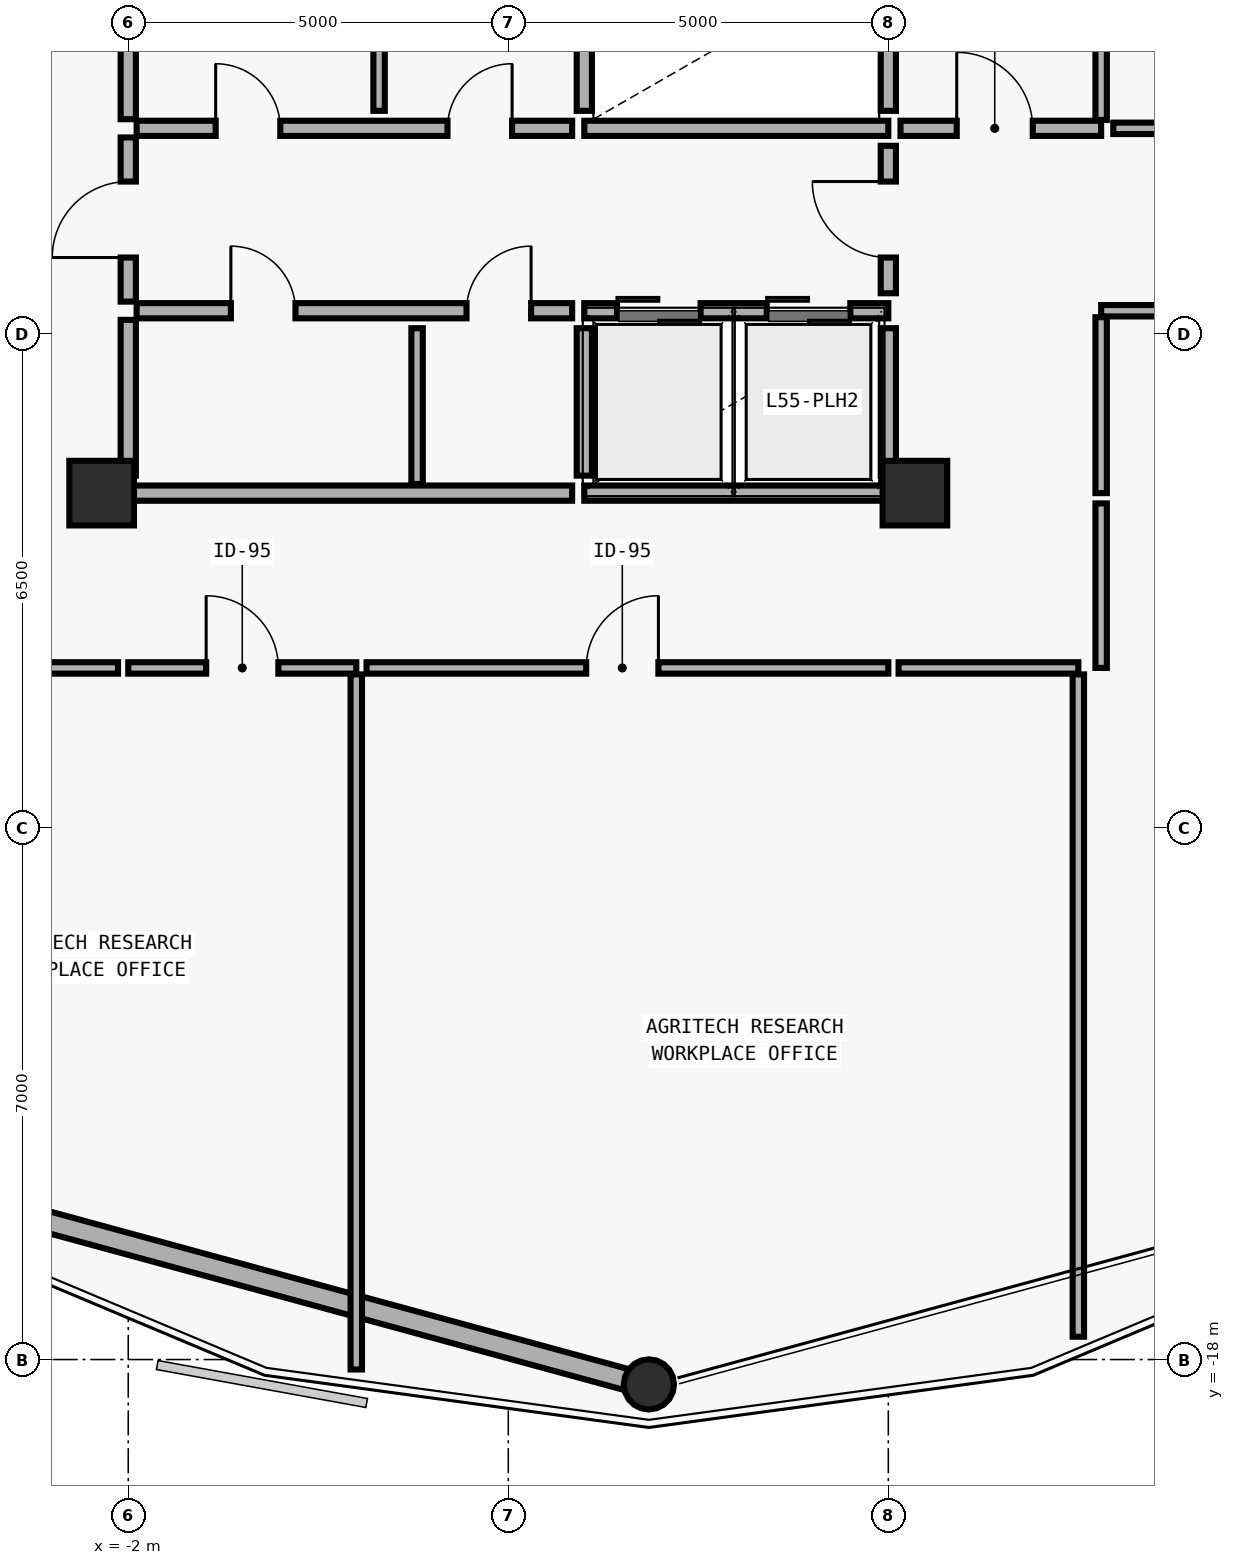
"""IFC4 building model, lengths in metres.
Left out: names, types, materials, properties, quantities, classifications, styles, units other than length and angle.
Written with IfcOpenShell. Run it as: python <this file> out.ifc"""

import sys

from ifc_helpers import new_model, si_unit, direction, frame, frame_2d, origin, origin_2d, place, context, subcontext, project, spatial, rectangle, hollow_circle, extrude, element, fill, save


model = new_model("IFC4")
c1 = context("Model", 3, precision=1e-05, world=origin(), true_north=direction((0.0, 1.0)))
c2 = subcontext(c1, "Body", "Model", "MODEL_VIEW")
j1 = project(units=[si_unit("LENGTHUNIT", "METRE"), si_unit("PLANEANGLEUNIT", "RADIAN")], contexts=[c1])
p1 = place(None, origin())
s1 = spatial("IfcSite", under=j1, at=p1, CompositionType="ELEMENT")
p2 = place(p1, origin())
s2 = spatial("IfcBuilding", under=s1, at=p2, CompositionType="ELEMENT")
p3 = place(p2, frame((0.0, 0.0, 218.4)))
s3 = spatial("IfcBuildingStorey", under=s2, at=p3, CompositionType="ELEMENT", Elevation=218.4)
for number, where, z_axis, x_axis in (
    (1, (-2.35, -6.6, 0.0), (0.0, 0.0, 1.0), (1.0, 0.0, 0.0)),
    (2, (8.35, -6.6, 0.0), (0.0, 0.0, 1.0), (1.0, 0.0, 0.0)),
):
    element("IfcColumn", number, at=place(p3, frame(where, z_axis=z_axis, x_axis=x_axis)), inside=s3, PredefinedType="COLUMN", context=c2, shape_type="SweptSolid", body=[
        extrude(rectangle(XDim=0.85, YDim=0.85, at=origin_2d()), origin(), (0.0, 0.0, 1.0), 3.575),
    ])
p4 = place(p3, frame((4.85, -18.344, 0.0), z_axis=(0.0, 0.009491514524, 0.999954954561), x_axis=(-1.0, 0.0, 0.0)))
e3 = element("IfcColumn", 3, at=p4, inside=s3, PredefinedType="COLUMN", context=c2, shape_type="SweptSolid", body=[
    extrude(hollow_circle(Radius=0.33, WallThickness=0.025, at=origin_2d()), origin(), (0.0, 0.0, 1.0), 3.575),
])
p5 = place(p3, frame((4.575, -18.269, 0.0), z_axis=(0.0, 0.0, 1.0), x_axis=(-0.964845001115, 0.262819565145, 0.0)))
e4 = element("IfcWall", 4, at=p5, inside=s3, PredefinedType="SOLIDWALL", context=c2, shape_type="SweptSolid", body=[
    extrude(rectangle(XDim=9.225, YDim=0.28, at=frame_2d((4.613, 0.0))), origin(), (0.0, 0.0, 1.0), 2.93),
])
p6 = place(p3, frame((4.0, -1.8, 0.0), z_axis=(0.0, 0.0, 1.0), x_axis=(1.0, 0.0, 0.0)))
e5 = element("IfcWall", 5, at=p6, inside=s3, PredefinedType="SOLIDWALL", context=c2, shape_type="SweptSolid", body=[
    extrude(rectangle(XDim=4.0, YDim=0.2, at=frame_2d((2.0, 0.0))), origin(), (0.0, 0.0, 1.0), 3.36),
])
p7 = place(p3, frame((4.0, -1.57, 0.0), z_axis=(0.0, 0.0, 1.0), x_axis=(0.0, 1.0, 0.0)))
e6 = element("IfcWall", 6, at=p7, inside=s3, PredefinedType="SOLIDWALL", context=c2, shape_type="SweptSolid", body=[
    extrude(rectangle(XDim=1.94, YDim=0.2, at=frame_2d((0.97, 0.0))), origin(), (0.0, 0.0, 1.0), 3.36),
])
p8 = place(p3, frame((8.0, -1.57, 0.0), z_axis=(0.0, 0.0, 1.0), x_axis=(0.0, 1.0, 0.0)))
e7 = element("IfcWall", 7, at=p8, inside=s3, PredefinedType="SOLIDWALL", context=c2, shape_type="SweptSolid", body=[
    extrude(rectangle(XDim=2.05, YDim=0.2, at=frame_2d((1.025, 0.0))), origin(), (0.0, 0.0, 1.0), 3.012),
])
p9 = place(p3, frame((4.0, -4.2, 0.0), z_axis=(0.0, 0.0, 1.0), x_axis=(1.0, 0.0, 0.0)))
e8 = element("IfcWall", 8, at=p9, inside=s3, PredefinedType="SOLIDWALL", context=c2, shape_type="SweptSolid", body=[
    extrude(rectangle(XDim=4.0, YDim=0.2, at=frame_2d((2.0, 0.0))), origin(), (0.0, 0.0, 1.0), 3.36),
])
p10 = place(p9, frame((0.43, 0.0, 0.0)))
e9 = element("IfcOpeningElement", 9, at=p10, cuts=e8, PredefinedType="OPENING", context=c2, shape_type="SweptSolid", body=[
    extrude(rectangle(XDim=1.1, YDim=2.2, at=frame_2d((0.55, 1.1))), frame((0.0, 0.11, 0.0), z_axis=(0.0, -1.0, 0.0), x_axis=(1.0, 0.0, 0.0)), (0.0, 0.0, 1.0), 0.22),
])
p11 = place(p9, frame((2.4, 0.0, 0.0)))
e10 = element("IfcOpeningElement", 10, at=p11, cuts=e8, PredefinedType="OPENING", context=c2, shape_type="SweptSolid", body=[
    extrude(rectangle(XDim=1.1, YDim=2.2, at=frame_2d((0.55, 1.1))), frame((0.0, 0.11, 0.0), z_axis=(0.0, -1.0, 0.0), x_axis=(1.0, 0.0, 0.0)), (0.0, 0.0, 1.0), 0.22),
])
p12 = place(p3, frame((4.0, -6.6, 0.0), z_axis=(0.0, 0.0, 1.0), x_axis=(1.0, 0.0, 0.0)))
e11 = element("IfcWall", 11, at=p12, inside=s3, PredefinedType="SOLIDWALL", context=c2, shape_type="SweptSolid", body=[
    extrude(rectangle(XDim=4.0, YDim=0.2, at=frame_2d((2.0, 0.0))), origin(), (0.0, 0.0, 1.0), 3.012),
])
p13 = place(p3, frame((4.0, -6.37, 0.0), z_axis=(0.0, 0.0, 1.0), x_axis=(0.0, 1.0, 0.0)))
e12 = element("IfcWall", 12, at=p13, inside=s3, PredefinedType="SOLIDWALL", context=c2, shape_type="SweptSolid", body=[
    extrude(rectangle(XDim=1.94, YDim=0.2, at=frame_2d((0.97, 0.0))), origin(), (0.0, 0.0, 1.0), 3.36),
])
p14 = place(p3, frame((8.0, -6.37, 0.0), z_axis=(0.0, 0.0, 1.0), x_axis=(0.0, 1.0, 0.0)))
e13 = element("IfcWall", 13, at=p14, inside=s3, PredefinedType="SOLIDWALL", context=c2, shape_type="SweptSolid", body=[
    extrude(rectangle(XDim=1.94, YDim=0.2, at=frame_2d((0.97, 0.0))), origin(), (0.0, 0.0, 1.0), 3.012),
])
p15 = place(p3, frame((-2.0, -4.08, 0.0), z_axis=(0.0, 0.0, 1.0), x_axis=(0.0, 1.0, 0.0)))
e14 = element("IfcWall", 14, at=p15, inside=s3, PredefinedType="MOVABLE", context=c2, shape_type="SweptSolid", body=[
    extrude(rectangle(XDim=2.16, YDim=0.2, at=frame_2d((1.08, 0.0))), origin(), (0.0, 0.0, 1.0), 3.012),
])
p16 = place(p15, frame((0.58, 0.0, 0.0)))
e15 = element("IfcOpeningElement", 15, at=p16, cuts=e14, PredefinedType="OPENING", context=c2, shape_type="SweptSolid", body=[
    extrude(rectangle(XDim=1.0, YDim=2.1, at=frame_2d((0.5, 1.05))), frame((0.0, 0.11, 0.0), z_axis=(0.0, -1.0, 0.0), x_axis=(1.0, 0.0, 0.0)), (0.0, 0.0, 1.0), 0.22),
])
p17 = place(p3, frame((8.0, -3.97, 0.0), z_axis=(0.0, 0.0, 1.0), x_axis=(0.0, 1.0, 0.0)))
e16 = element("IfcWall", 16, at=p17, inside=s3, PredefinedType="MOVABLE", context=c2, shape_type="SweptSolid", body=[
    extrude(rectangle(XDim=1.94, YDim=0.2, at=frame_2d((0.97, 0.0))), origin(), (0.0, 0.0, 1.0), 3.012),
])
p18 = place(p17, frame((0.47, 0.0, 0.0)))
e17 = element("IfcOpeningElement", 17, at=p18, cuts=e16, PredefinedType="OPENING", context=c2, shape_type="SweptSolid", body=[
    extrude(rectangle(XDim=1.0, YDim=2.1, at=frame_2d((0.5, 1.05))), frame((0.0, 0.11, 0.0), z_axis=(0.0, -1.0, 0.0), x_axis=(1.0, 0.0, 0.0)), (0.0, 0.0, 1.0), 0.22),
])
p19 = place(p3, frame((-1.89, -1.8, 0.0), z_axis=(0.0, 0.0, 1.0), x_axis=(1.0, 0.0, 0.0)))
e18 = element("IfcWall", 18, at=p19, inside=s3, PredefinedType="MOVABLE", context=c2, shape_type="SweptSolid", body=[
    extrude(rectangle(XDim=5.73, YDim=0.2, at=frame_2d((2.865, 0.0))), origin(), (0.0, 0.0, 1.0), 3.36),
])
p20 = place(p19, frame((1.04, 0.0, 0.0)))
e19 = element("IfcOpeningElement", 19, at=p20, cuts=e18, PredefinedType="OPENING", context=c2, shape_type="SweptSolid", body=[
    extrude(rectangle(XDim=0.85, YDim=2.1, at=frame_2d((0.425, 1.05))), frame((0.0, 0.11, 0.0), z_axis=(0.0, -1.0, 0.0), x_axis=(1.0, 0.0, 0.0)), (0.0, 0.0, 1.0), 0.22),
])
p21 = place(p19, frame((4.09, 0.0, 0.0)))
e20 = element("IfcOpeningElement", 20, at=p21, cuts=e18, PredefinedType="OPENING", context=c2, shape_type="SweptSolid", body=[
    extrude(rectangle(XDim=0.85, YDim=2.1, at=frame_2d((0.425, 1.05))), frame((0.0, 0.11, 0.0), z_axis=(0.0, -1.0, 0.0), x_axis=(1.0, 0.0, 0.0)), (0.0, 0.0, 1.0), 0.22),
])
p22 = place(p3, frame((-1.89, -4.2, 0.0), z_axis=(0.0, 0.0, 1.0), x_axis=(1.0, 0.0, 0.0)))
e21 = element("IfcWall", 21, at=p22, inside=s3, PredefinedType="MOVABLE", context=c2, shape_type="SweptSolid", body=[
    extrude(rectangle(XDim=5.73, YDim=0.2, at=frame_2d((2.865, 0.0))), origin(), (0.0, 0.0, 1.0), 3.36),
])
p23 = place(p22, frame((1.24, 0.0, 0.0)))
e22 = element("IfcOpeningElement", 22, at=p23, cuts=e21, PredefinedType="OPENING", context=c2, shape_type="SweptSolid", body=[
    extrude(rectangle(XDim=0.85, YDim=2.1, at=frame_2d((0.425, 1.05))), frame((0.0, 0.11, 0.0), z_axis=(0.0, -1.0, 0.0), x_axis=(1.0, 0.0, 0.0)), (0.0, 0.0, 1.0), 0.22),
])
p24 = place(p22, frame((4.34, 0.0, 0.0)))
e23 = element("IfcOpeningElement", 23, at=p24, cuts=e21, PredefinedType="OPENING", context=c2, shape_type="SweptSolid", body=[
    extrude(rectangle(XDim=0.85, YDim=2.1, at=frame_2d((0.425, 1.05))), frame((0.0, 0.11, 0.0), z_axis=(0.0, -1.0, 0.0), x_axis=(1.0, 0.0, 0.0)), (0.0, 0.0, 1.0), 0.22),
])
p25 = place(p3, frame((8.16, -1.8, 0.0), z_axis=(0.0, 0.0, 1.0), x_axis=(1.0, 0.0, 0.0)))
e24 = element("IfcWall", 24, at=p25, inside=s3, PredefinedType="MOVABLE", context=c2, shape_type="SweptSolid", body=[
    extrude(rectangle(XDim=2.64, YDim=0.2, at=frame_2d((1.32, 0.0))), origin(), (0.0, 0.0, 1.0), 3.36),
])
p26 = place(p25, frame((0.74, 0.0, 0.0)))
e25 = element("IfcOpeningElement", 25, at=p26, cuts=e24, PredefinedType="OPENING", context=c2, shape_type="SweptSolid", body=[
    extrude(rectangle(XDim=1.0, YDim=2.1, at=frame_2d((0.5, 1.05))), frame((0.0, 0.11, 0.0), z_axis=(0.0, -1.0, 0.0), x_axis=(1.0, 0.0, 0.0)), (0.0, 0.0, 1.0), 0.22),
])
p27 = place(p3, frame((-2.0, -8.9, 0.0), z_axis=(0.0, 0.0, 1.0), x_axis=(1.0, 0.0, 0.0)))
e26 = element("IfcWall", 26, at=p27, inside=s3, PredefinedType="PARTITIONING", context=c2, shape_type="SweptSolid", body=[
    extrude(rectangle(XDim=3.0, YDim=0.15, at=frame_2d((1.5, 0.0))), origin(), (0.0, 0.0, 1.0), 3.36),
])
p28 = place(p27, frame((1.025, 0.0, 0.0)))
e27 = element("IfcOpeningElement", 27, at=p28, cuts=e26, PredefinedType="OPENING", context=c2, shape_type="SweptSolid", body=[
    extrude(rectangle(XDim=0.95, YDim=2.1, at=frame_2d((0.475, 1.05))), frame((0.0, 0.085, 0.0), z_axis=(0.0, -1.0, 0.0), x_axis=(1.0, 0.0, 0.0)), (0.0, 0.0, 1.0), 0.17),
])
p29 = place(p3, frame((1.135, -8.9, 0.0), z_axis=(0.0, 0.0, 1.0), x_axis=(1.0, 0.0, 0.0)))
e28 = element("IfcWall", 28, at=p29, inside=s3, PredefinedType="PARTITIONING", context=c2, shape_type="SweptSolid", body=[
    extrude(rectangle(XDim=6.865, YDim=0.15, at=frame_2d((3.433, 0.0))), origin(), (0.0, 0.0, 1.0), 3.36),
])
p30 = place(p29, frame((2.89, 0.0, 0.0)))
e29 = element("IfcOpeningElement", 29, at=p30, cuts=e28, PredefinedType="OPENING", context=c2, shape_type="SweptSolid", body=[
    extrude(rectangle(XDim=0.95, YDim=2.1, at=frame_2d((0.475, 1.05))), frame((0.0, 0.085, 0.0), z_axis=(0.0, -1.0, 0.0), x_axis=(1.0, 0.0, 0.0)), (0.0, 0.0, 1.0), 0.17),
])
p31 = place(p3, frame((10.8, -4.2, 0.0), z_axis=(0.0, 0.0, 1.0), x_axis=(1.0, 0.0, 0.0)))
e30 = element("IfcWall", 30, at=p31, inside=s3, PredefinedType="PARTITIONING", context=c2, shape_type="SweptSolid", body=[
    extrude(rectangle(XDim=7.7, YDim=0.15, at=frame_2d((3.85, 0.0))), origin(), (0.0, 0.0, 1.0), 3.36),
])
p32 = place(p31, frame((3.375, 0.0, 0.0)))
e31 = element("IfcOpeningElement", 31, at=p32, cuts=e30, PredefinedType="OPENING", context=c2, shape_type="SweptSolid", body=[
    extrude(rectangle(XDim=0.95, YDim=2.1, at=frame_2d((0.475, 1.05))), frame((0.0, 0.085, 0.0), z_axis=(0.0, -1.0, 0.0), x_axis=(1.0, 0.0, 0.0)), (0.0, 0.0, 1.0), 0.17),
])
p33 = place(p3, frame((10.8, -1.69, 0.0), z_axis=(0.0, 0.0, 1.0), x_axis=(0.0, 1.0, 0.0)))
e32 = element("IfcWall", 32, at=p33, inside=s3, PredefinedType="PARTITIONING", context=c2, shape_type="SweptSolid", body=[
    extrude(rectangle(XDim=8.19, YDim=0.15, at=frame_2d((4.095, 0.0))), origin(), (0.0, 0.0, 1.0), 3.36),
])
p34 = place(p33, frame((3.565, 0.0, 0.0)))
e33 = element("IfcOpeningElement", 33, at=p34, cuts=e32, PredefinedType="OPENING", context=c2, shape_type="SweptSolid", body=[
    extrude(rectangle(XDim=0.95, YDim=2.1, at=frame_2d((0.475, 1.05))), frame((0.0, 0.085, 0.0), z_axis=(0.0, -1.0, 0.0), x_axis=(1.0, 0.0, 0.0)), (0.0, 0.0, 1.0), 0.17),
])
p35 = place(p3, frame((1.3, -1.57, 0.0), z_axis=(0.0, 0.0, 1.0), x_axis=(0.0, 1.0, 0.0)))
e34 = element("IfcWall", 34, at=p35, inside=s3, PredefinedType="PARTITIONING", context=c2, shape_type="SweptSolid", body=[
    extrude(rectangle(XDim=1.94, YDim=0.15, at=frame_2d((0.97, 0.0))), origin(), (0.0, 0.0, 1.0), 3.36),
])
p36 = place(p3, frame((-2.0, -1.68, 0.0), z_axis=(0.0, 0.0, 1.0), x_axis=(0.0, 1.0, 0.0)))
e35 = element("IfcWall", 35, at=p36, inside=s3, PredefinedType="MOVABLE", context=c2, shape_type="SweptSolid", body=[
    extrude(rectangle(XDim=2.16, YDim=0.2, at=frame_2d((1.08, 0.0))), origin(), (0.0, 0.0, 1.0), 3.012),
])
p37 = place(p3, frame((1.8, -6.48, 0.0), z_axis=(0.0, 0.0, 1.0), x_axis=(0.0, 1.0, 0.0)))
e36 = element("IfcWall", 36, at=p37, inside=s3, PredefinedType="PARTITIONING", context=c2, shape_type="SweptSolid", body=[
    extrude(rectangle(XDim=2.05, YDim=0.15, at=frame_2d((1.025, 0.0))), origin(), (0.0, 0.0, 1.0), 3.36),
])
p38 = place(p3, frame((-2.0, -6.6, 0.0), z_axis=(0.0, 0.0, 1.0), x_axis=(1.0, 0.0, 0.0)))
e37 = element("IfcWall", 37, at=p38, inside=s3, PredefinedType="MOVABLE", context=c2, shape_type="SweptSolid", body=[
    extrude(rectangle(XDim=5.84, YDim=0.2, at=frame_2d((2.92, 0.0))), origin(), (0.0, 0.0, 1.0), 3.012),
])
p39 = place(p3, frame((-2.0, -6.37, 0.0), z_axis=(0.0, 0.0, 1.0), x_axis=(0.0, 1.0, 0.0)))
e38 = element("IfcWall", 38, at=p39, inside=s3, PredefinedType="MOVABLE", context=c2, shape_type="SweptSolid", body=[
    extrude(rectangle(XDim=2.05, YDim=0.2, at=frame_2d((1.025, 0.0))), origin(), (0.0, 0.0, 1.0), 3.012),
])
p40 = place(p3, frame((-4.6, -8.9, 0.0), z_axis=(0.0, 0.0, 1.0), x_axis=(1.0, 0.0, 0.0)))
e39 = element("IfcWall", 39, at=p40, inside=s3, PredefinedType="PARTITIONING", context=c2, shape_type="SweptSolid", body=[
    extrude(rectangle(XDim=2.465, YDim=0.15, at=frame_2d((1.232, 0.0))), origin(), (0.0, 0.0, 1.0), 3.36),
])
p41 = place(p3, frame((1.0, -8.985, 0.0), z_axis=(0.0, 0.0, 1.0), x_axis=(0.0, -1.0, 0.0)))
e40 = element("IfcWall", 40, at=p41, inside=s3, PredefinedType="PARTITIONING", context=c2, shape_type="SweptSolid", body=[
    extrude(rectangle(XDim=9.146, YDim=0.15, at=frame_2d((4.573, 0.0))), origin(), (0.0, 0.0, 1.0), 3.36),
])
p42 = place(p3, frame((8.135, -8.9, 0.0), z_axis=(0.0, 0.0, 1.0), x_axis=(1.0, 0.0, 0.0)))
e41 = element("IfcWall", 41, at=p42, inside=s3, PredefinedType="PARTITIONING", context=c2, shape_type="SweptSolid", body=[
    extrude(rectangle(XDim=2.365, YDim=0.15, at=frame_2d((1.183, 0.0))), origin(), (0.0, 0.0, 1.0), 3.36),
])
p43 = place(p3, frame((10.5, -8.985, 0.0), z_axis=(0.0, 0.0, 1.0), x_axis=(0.0, -1.0, 0.0)))
e42 = element("IfcWall", 42, at=p43, inside=s3, PredefinedType="PARTITIONING", context=c2, shape_type="SweptSolid", body=[
    extrude(rectangle(XDim=8.715, YDim=0.15, at=frame_2d((4.357, 0.0))), origin(), (0.0, 0.0, 1.0), 3.36),
])
p44 = place(p3, frame((10.8, -6.6, 0.0), z_axis=(0.0, 0.0, 1.0), x_axis=(0.0, 1.0, 0.0)))
e43 = element("IfcWall", 43, at=p44, inside=s3, PredefinedType="PARTITIONING", context=c2, shape_type="SweptSolid", body=[
    extrude(rectangle(XDim=2.315, YDim=0.15, at=frame_2d((1.158, 0.0))), origin(), (0.0, 0.0, 1.0), 3.36),
])
p45 = place(p3, frame((10.8, -8.9, 0.0), z_axis=(0.0, 0.0, 1.0), x_axis=(0.0, 1.0, 0.0)))
e44 = element("IfcWall", 44, at=p45, inside=s3, PredefinedType="PARTITIONING", context=c2, shape_type="SweptSolid", body=[
    extrude(rectangle(XDim=2.165, YDim=0.15, at=frame_2d((1.083, 0.0))), origin(), (0.0, 0.0, 1.0), 3.36),
])
p46 = place(p3, frame((17.5, -1.8, 0.0), z_axis=(0.0, 0.0, 1.0), x_axis=(-1.0, 0.0, 0.0)))
e45 = element("IfcWall", 45, at=p46, inside=s3, PredefinedType="PARTITIONING", context=c2, shape_type="SweptSolid", body=[
    extrude(rectangle(XDim=6.54, YDim=0.15, at=frame_2d((3.27, 0.0))), origin(), (0.0, 0.0, 1.0), 3.36),
])
p47 = place(p16, origin())
e46 = element("IfcDoor", 46, at=p47, inside=s3, OperationType="SINGLE_SWING_LEFT", PredefinedType="DOOR", context=c2, shape_type="SweptSolid", body=[
    extrude(rectangle(XDim=1.0, YDim=2.1, at=frame_2d((0.5, 1.05))), frame((0.0, 0.025, 0.0), z_axis=(0.0, -1.0, 0.0), x_axis=(1.0, 0.0, 0.0)), (0.0, 0.0, 1.0), 0.05),
])
fill(e15, e46)
p48 = place(p18, origin())
e47 = element("IfcDoor", 47, at=p48, inside=s3, OperationType="SINGLE_SWING_RIGHT", PredefinedType="DOOR", context=c2, shape_type="SweptSolid", body=[
    extrude(rectangle(XDim=1.0, YDim=2.1, at=frame_2d((0.5, 1.05))), frame((0.0, 0.025, 0.0), z_axis=(0.0, -1.0, 0.0), x_axis=(1.0, 0.0, 0.0)), (0.0, 0.0, 1.0), 0.05),
])
fill(e17, e47)
p49 = place(p20, origin())
e48 = element("IfcDoor", 48, at=p49, inside=s3, OperationType="SINGLE_SWING_LEFT", PredefinedType="DOOR", context=c2, shape_type="SweptSolid", body=[
    extrude(rectangle(XDim=0.85, YDim=2.1, at=frame_2d((0.425, 1.05))), frame((0.0, 0.025, 0.0), z_axis=(0.0, -1.0, 0.0), x_axis=(1.0, 0.0, 0.0)), (0.0, 0.0, 1.0), 0.05),
])
fill(e19, e48)
p50 = place(p21, origin())
e49 = element("IfcDoor", 49, at=p50, inside=s3, OperationType="SINGLE_SWING_RIGHT", PredefinedType="DOOR", context=c2, shape_type="SweptSolid", body=[
    extrude(rectangle(XDim=0.85, YDim=2.1, at=frame_2d((0.425, 1.05))), frame((0.0, 0.025, 0.0), z_axis=(0.0, -1.0, 0.0), x_axis=(1.0, 0.0, 0.0)), (0.0, 0.0, 1.0), 0.05),
])
fill(e20, e49)
p51 = place(p23, origin())
e50 = element("IfcDoor", 50, at=p51, inside=s3, OperationType="SINGLE_SWING_LEFT", PredefinedType="DOOR", context=c2, shape_type="SweptSolid", body=[
    extrude(rectangle(XDim=0.85, YDim=2.1, at=frame_2d((0.425, 1.05))), frame((0.0, 0.025, 0.0), z_axis=(0.0, -1.0, 0.0), x_axis=(1.0, 0.0, 0.0)), (0.0, 0.0, 1.0), 0.05),
])
fill(e22, e50)
p52 = place(p24, origin())
e51 = element("IfcDoor", 51, at=p52, inside=s3, OperationType="SINGLE_SWING_RIGHT", PredefinedType="DOOR", context=c2, shape_type="SweptSolid", body=[
    extrude(rectangle(XDim=0.85, YDim=2.1, at=frame_2d((0.425, 1.05))), frame((0.0, 0.025, 0.0), z_axis=(0.0, -1.0, 0.0), x_axis=(1.0, 0.0, 0.0)), (0.0, 0.0, 1.0), 0.05),
])
fill(e23, e51)
p53 = place(p26, origin())
e52 = element("IfcDoor", 52, at=p53, inside=s3, OperationType="SINGLE_SWING_LEFT", PredefinedType="DOOR", context=c2, shape_type="SweptSolid", body=[
    extrude(rectangle(XDim=1.0, YDim=2.1, at=frame_2d((0.5, 1.05))), frame((0.0, 0.025, 0.0), z_axis=(0.0, -1.0, 0.0), x_axis=(1.0, 0.0, 0.0)), (0.0, 0.0, 1.0), 0.05),
])
fill(e25, e52)
p54 = place(p28, origin())
e53 = element("IfcDoor", 53, at=p54, inside=s3, OperationType="SINGLE_SWING_LEFT", PredefinedType="DOOR", context=c2, shape_type="SweptSolid", body=[
    extrude(rectangle(XDim=0.95, YDim=2.1, at=frame_2d((0.475, 1.05))), frame((0.0, 0.025, 0.0), z_axis=(0.0, -1.0, 0.0), x_axis=(1.0, 0.0, 0.0)), (0.0, 0.0, 1.0), 0.05),
])
fill(e27, e53)
p55 = place(p30, origin())
e54 = element("IfcDoor", 54, at=p55, inside=s3, OperationType="SINGLE_SWING_RIGHT", PredefinedType="DOOR", context=c2, shape_type="SweptSolid", body=[
    extrude(rectangle(XDim=0.95, YDim=2.1, at=frame_2d((0.475, 1.05))), frame((0.0, 0.025, 0.0), z_axis=(0.0, -1.0, 0.0), x_axis=(1.0, 0.0, 0.0)), (0.0, 0.0, 1.0), 0.05),
])
fill(e29, e54)
p56 = place(p10, origin())
e55 = element("IfcDoor", 55, at=p56, inside=s3, OperationType="DOUBLE_DOOR_SLIDING", PredefinedType="DOOR", context=c2, shape_type="SweptSolid", body=[
    extrude(rectangle(XDim=1.1, YDim=2.2, at=frame_2d((0.55, 1.1))), frame((0.0, 0.025, 0.0), z_axis=(0.0, -1.0, 0.0), x_axis=(1.0, 0.0, 0.0)), (0.0, 0.0, 1.0), 0.05),
])
fill(e9, e55)
p57 = place(p11, origin())
e56 = element("IfcDoor", 56, at=p57, inside=s3, OperationType="DOUBLE_DOOR_SLIDING", PredefinedType="DOOR", context=c2, shape_type="SweptSolid", body=[
    extrude(rectangle(XDim=1.1, YDim=2.2, at=frame_2d((0.55, 1.1))), frame((0.0, 0.025, 0.0), z_axis=(0.0, -1.0, 0.0), x_axis=(1.0, 0.0, 0.0)), (0.0, 0.0, 1.0), 0.05),
])
fill(e10, e56)
save(model, sys.argv[1])
